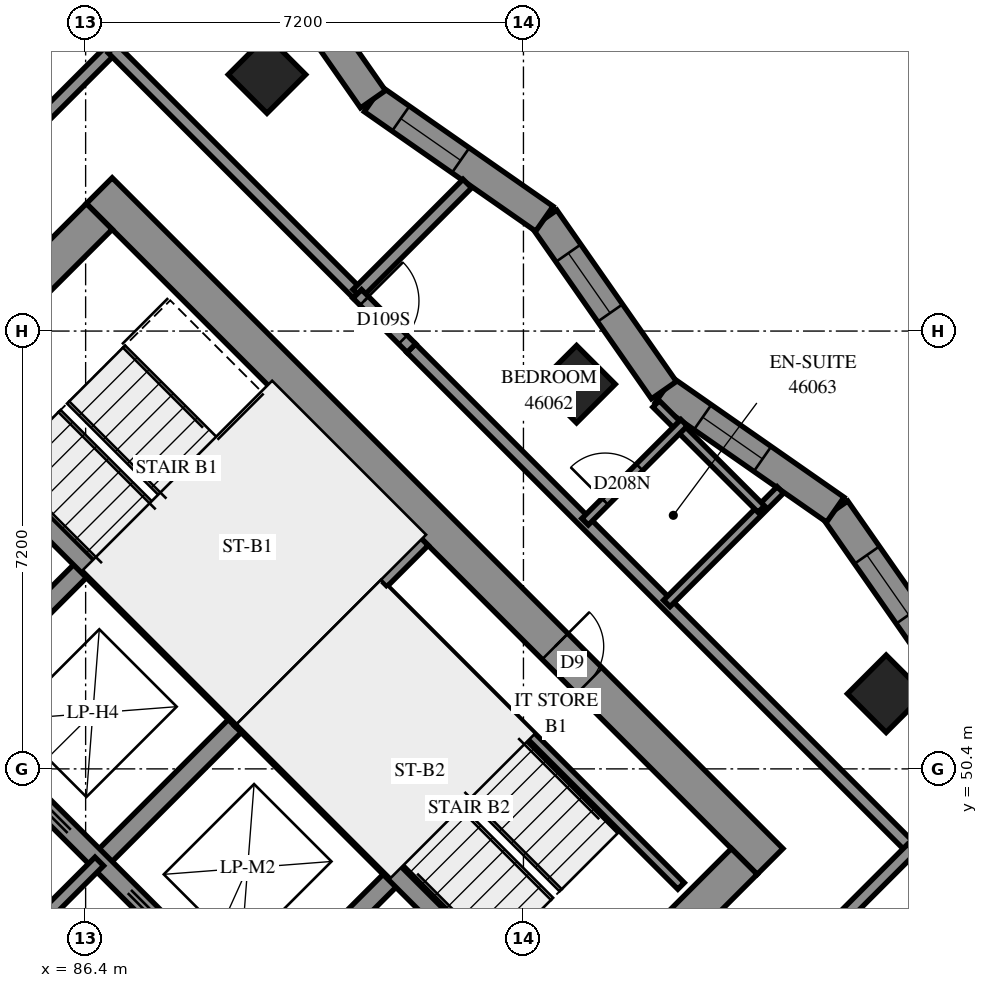
"""IFC4 building model, lengths in metres.
Left out: names, types, materials, properties, quantities, classifications, styles, units other than length and angle.
Written with IfcOpenShell. Run it as: python <this file> out.ifc"""

import sys

from ifc_helpers import new_model, si_unit, direction, frame, frame_2d, origin, origin_2d, place, context, subcontext, project, spatial, polyline, rectangle, outline, extrude, element, fill, save


model = new_model("IFC4")
c1 = context("Model", 3, precision=1e-05, world=origin(), true_north=direction((0.0, 1.0)))
c2 = subcontext(c1, "Body", "Model", "MODEL_VIEW")
j1 = project(units=[si_unit("LENGTHUNIT", "METRE"), si_unit("PLANEANGLEUNIT", "RADIAN")], contexts=[c1])
p1 = place(None, origin())
s1 = spatial("IfcSite", under=j1, at=p1, CompositionType="ELEMENT")
p2 = place(p1, origin())
s2 = spatial("IfcBuilding", under=s1, at=p2, CompositionType="ELEMENT")
p3 = place(p2, frame((0.0, 0.0, 169.4)))
s3 = spatial("IfcBuildingStorey", under=s2, at=p3, CompositionType="ELEMENT", Elevation=169.4)
for number, where, z_axis, x_axis in (
    (1, (89.382, 61.818, 0.0), (0.0, 0.0, 1.0), (0.707, -0.707, 0.0)),
    (2, (94.474, 56.727, 0.0), (0.0, 0.0, 1.0), (0.707, -0.707, 0.0)),
    (3, (99.565, 51.635, 0.0), (0.0, 0.0, 1.0), (0.707, -0.707, 0.0)),
):
    element("IfcColumn", number, at=place(p3, frame(where, z_axis=z_axis, x_axis=x_axis)), inside=s3, PredefinedType="COLUMN", context=c2, shape_type="SweptSolid", body=[
        extrude(rectangle(XDim=0.9, YDim=0.9, at=origin_2d()), origin(), (0.0, 0.0, 1.0), 3.1),
    ])
p4 = place(p3, frame((76.018, 49.302, -0.3), z_axis=(0.0, 0.0, 1.0), x_axis=(0.7071067812, -0.7071067812, 0.0)))
e4 = element("IfcWall", 4, at=p4, inside=s3, PredefinedType="SHEAR", context=c2, shape_type="SweptSolid", body=[
    extrude(rectangle(XDim=15.6, YDim=0.6, at=frame_2d((7.8, 0.0))), origin(), (0.0, 0.0, 1.0), 2.7),
])
p5 = place(p3, frame((86.625, 59.908, -0.3), z_axis=(0.0, 0.0, 1.0), x_axis=(0.7071067812, -0.7071067812, 0.0)))
e5 = element("IfcWall", 5, at=p5, inside=s3, PredefinedType="SHEAR", context=c2, shape_type="SweptSolid", body=[
    extrude(rectangle(XDim=15.6, YDim=0.6, at=frame_2d((7.8, 0.0))), origin(), (0.0, 0.0, 1.0), 2.7),
])
p6 = place(p5, frame((10.6, 0.0, 0.3)))
e6 = element("IfcOpeningElement", 6, at=p6, cuts=e5, PredefinedType="OPENING", context=c2, shape_type="SweptSolid", body=[
    extrude(rectangle(XDim=0.8, YDim=2.1, at=frame_2d((0.4, 1.05))), frame((0.0, 0.31, 0.0), z_axis=(0.0, -1.0, 0.0), x_axis=(1.0, 0.0, 0.0)), (0.0, 0.0, 1.0), 0.62),
])
p7 = place(p3, frame((76.442, 49.302, -0.3), z_axis=(0.0, 0.0, 1.0), x_axis=(0.7071067812, 0.7071067812, 0.0)))
e7 = element("IfcWall", 7, at=p7, inside=s3, PredefinedType="SHEAR", context=c2, shape_type="SweptSolid", body=[
    extrude(rectangle(XDim=14.4, YDim=0.6, at=frame_2d((7.2, 0.0))), origin(), (0.0, 0.0, 1.0), 2.7),
])
p8 = place(p7, frame((4.55, 0.0, 0.3)))
e8 = element("IfcOpeningElement", 8, at=p8, cuts=e7, PredefinedType="OPENING", context=c2, shape_type="SweptSolid", body=[
    extrude(rectangle(XDim=1.1, YDim=2.1, at=frame_2d((0.55, 1.05))), frame((0.0, 0.31, 0.0), z_axis=(0.0, -1.0, 0.0), x_axis=(1.0, 0.0, 0.0)), (0.0, 0.0, 1.0), 0.62),
])
p9 = place(p7, frame((11.35, 0.0, 0.3)))
e9 = element("IfcOpeningElement", 9, at=p9, cuts=e7, PredefinedType="OPENING", context=c2, shape_type="SweptSolid", body=[
    extrude(rectangle(XDim=1.1, YDim=2.1, at=frame_2d((0.55, 1.05))), frame((0.0, 0.31, 0.0), z_axis=(0.0, -1.0, 0.0), x_axis=(1.0, 0.0, 0.0)), (0.0, 0.0, 1.0), 0.62),
])
p10 = place(p3, frame((87.049, 38.695, -0.3), z_axis=(0.0, 0.0, 1.0), x_axis=(0.7071067812, 0.7071067812, 0.0)))
e10 = element("IfcWall", 10, at=p10, inside=s3, PredefinedType="SHEAR", context=c2, shape_type="SweptSolid", body=[
    extrude(rectangle(XDim=14.4, YDim=0.6, at=frame_2d((7.2, 0.0))), origin(), (0.0, 0.0, 1.0), 2.7),
])
p11 = place(p10, frame((4.55, 0.0, 0.3)))
e11 = element("IfcOpeningElement", 11, at=p11, cuts=e10, PredefinedType="OPENING", context=c2, shape_type="SweptSolid", body=[
    extrude(rectangle(XDim=1.1, YDim=2.1, at=frame_2d((0.55, 1.05))), frame((0.0, 0.31, 0.0), z_axis=(0.0, -1.0, 0.0), x_axis=(1.0, 0.0, 0.0)), (0.0, 0.0, 1.0), 0.62),
])
p12 = place(p10, frame((11.35, 0.0, 0.3)))
e12 = element("IfcOpeningElement", 12, at=p12, cuts=e10, PredefinedType="OPENING", context=c2, shape_type="SweptSolid", body=[
    extrude(rectangle(XDim=1.1, YDim=2.1, at=frame_2d((0.55, 1.05))), frame((0.0, 0.31, 0.0), z_axis=(0.0, -1.0, 0.0), x_axis=(1.0, 0.0, 0.0)), (0.0, 0.0, 1.0), 0.62),
])
p13 = place(p3, frame((84.079, 51.423, 0.0), z_axis=(0.0, 0.0, 1.0), x_axis=(0.7071219326, 0.7070916295, 0.0)))
e13 = element("IfcWall", 13, at=p13, inside=s3, PredefinedType="SOLIDWALL", context=c2, shape_type="SweptSolid", body=[
    extrude(rectangle(XDim=3.3, YDim=0.3, at=frame_2d((1.65, 0.0))), origin(), (0.0, 0.0, 1.0), 3.1),
])
for number, where, z_axis, x_axis in (
    (14, (86.625, 48.878, 0.0), (0.0, 0.0, 1.0), (0.707, 0.707, 0.0)),
    (15, (89.17, 46.332, 0.0), (0.0, 0.0, 1.0), (0.707, 0.707, 0.0)),
):
    element("IfcWall", number, at=place(p3, frame(where, z_axis=z_axis, x_axis=x_axis)), inside=s3, PredefinedType="SOLIDWALL", context=c2, shape_type="SweptSolid", body=[
        extrude(rectangle(XDim=3.3, YDim=0.3, at=frame_2d((1.65, 0.0))), origin(), (0.0, 0.0, 1.0), 3.1),
    ])
p14 = place(p3, frame((78.988, 51.423, 0.0), z_axis=(0.0, 0.0, 1.0), x_axis=(0.7071067812, -0.7071067812, 0.0)))
e16 = element("IfcWall", 16, at=p14, inside=s3, PredefinedType="SOLIDWALL", context=c2, shape_type="SweptSolid", body=[
    extrude(rectangle(XDim=14.4, YDim=0.3, at=frame_2d((7.2, 0.0))), origin(), (0.0, 0.0, 1.0), 3.1),
])
p15 = place(p14, frame((1.35, 0.0, 0.0)))
e17 = element("IfcOpeningElement", 17, at=p15, cuts=e16, PredefinedType="OPENING", context=c2, shape_type="SweptSolid", body=[
    extrude(rectangle(XDim=0.9, YDim=2.1, at=frame_2d((0.45, 1.05))), frame((0.0, 0.16, 0.0), z_axis=(0.0, -1.0, 0.0), x_axis=(1.0, 0.0, 0.0)), (0.0, 0.0, 1.0), 0.32),
])
p16 = place(p14, frame((4.95, 0.0, 0.0)))
e18 = element("IfcOpeningElement", 18, at=p16, cuts=e16, PredefinedType="OPENING", context=c2, shape_type="SweptSolid", body=[
    extrude(rectangle(XDim=0.9, YDim=2.1, at=frame_2d((0.45, 1.05))), frame((0.0, 0.16, 0.0), z_axis=(0.0, -1.0, 0.0), x_axis=(1.0, 0.0, 0.0)), (0.0, 0.0, 1.0), 0.32),
])
p17 = place(p14, frame((8.55, 0.0, 0.0)))
e19 = element("IfcOpeningElement", 19, at=p17, cuts=e16, PredefinedType="OPENING", context=c2, shape_type="SweptSolid", body=[
    extrude(rectangle(XDim=0.9, YDim=2.1, at=frame_2d((0.45, 1.05))), frame((0.0, 0.16, 0.0), z_axis=(0.0, -1.0, 0.0), x_axis=(1.0, 0.0, 0.0)), (0.0, 0.0, 1.0), 0.32),
])
p18 = place(p14, frame((12.05, 0.0, 0.0)))
e20 = element("IfcOpeningElement", 20, at=p18, cuts=e16, PredefinedType="OPENING", context=c2, shape_type="SweptSolid", body=[
    extrude(rectangle(XDim=1.1, YDim=2.1, at=frame_2d((0.55, 1.05))), frame((0.0, 0.16, 0.0), z_axis=(0.0, -1.0, 0.0), x_axis=(1.0, 0.0, 0.0)), (0.0, 0.0, 1.0), 0.32),
])
p19 = place(p3, frame((81.534, 53.969, 0.0), z_axis=(0.0, 0.0, 1.0), x_axis=(0.707103309, -0.7071102534, 0.0)))
e21 = element("IfcWall", 21, at=p19, inside=s3, PredefinedType="SOLIDWALL", context=c2, shape_type="SweptSolid", body=[
    extrude(rectangle(XDim=14.4, YDim=0.3, at=frame_2d((7.2, 0.0))), origin(), (0.0, 0.0, 1.0), 3.1),
])
p20 = place(p19, frame((1.25, 0.0, 0.0)))
e22 = element("IfcOpeningElement", 22, at=p20, cuts=e21, PredefinedType="OPENING", context=c2, shape_type="SweptSolid", body=[
    extrude(rectangle(XDim=1.1, YDim=2.1, at=frame_2d((0.55, 1.05))), frame((0.0, 0.16, 0.0), z_axis=(0.0, -1.0, 0.0), x_axis=(1.0, 0.0, 0.0)), (0.0, 0.0, 1.0), 0.32),
])
p21 = place(p19, frame((4.85, 0.0, 0.0)))
e23 = element("IfcOpeningElement", 23, at=p21, cuts=e21, PredefinedType="OPENING", context=c2, shape_type="SweptSolid", body=[
    extrude(rectangle(XDim=1.1, YDim=2.1, at=frame_2d((0.55, 1.05))), frame((0.0, 0.16, 0.0), z_axis=(0.0, -1.0, 0.0), x_axis=(1.0, 0.0, 0.0)), (0.0, 0.0, 1.0), 0.32),
])
p22 = place(p19, frame((8.45, 0.0, 0.0)))
e24 = element("IfcOpeningElement", 24, at=p22, cuts=e21, PredefinedType="OPENING", context=c2, shape_type="SweptSolid", body=[
    extrude(rectangle(XDim=1.1, YDim=2.1, at=frame_2d((0.55, 1.05))), frame((0.0, 0.16, 0.0), z_axis=(0.0, -1.0, 0.0), x_axis=(1.0, 0.0, 0.0)), (0.0, 0.0, 1.0), 0.32),
])
p23 = place(p19, frame((12.05, 0.0, 0.0)))
e25 = element("IfcOpeningElement", 25, at=p23, cuts=e21, PredefinedType="OPENING", context=c2, shape_type="SweptSolid", body=[
    extrude(rectangle(XDim=1.1, YDim=2.1, at=frame_2d((0.55, 1.05))), frame((0.0, 0.16, 0.0), z_axis=(0.0, -1.0, 0.0), x_axis=(1.0, 0.0, 0.0)), (0.0, 0.0, 1.0), 0.32),
])
for number, where, z_axis, x_axis in (
    (26, (83.867, 56.302, 0.0), (0.0, 0.0, 1.0), (0.707, -0.707, 0.0)),
    (27, (88.958, 51.211, 0.0), (0.0, 0.0, 1.0), (0.707, -0.707, 0.0)),
):
    element("IfcWall", number, at=place(p3, frame(where, z_axis=z_axis, x_axis=x_axis)), inside=s3, PredefinedType="SOLIDWALL", context=c2, shape_type="SweptSolid", body=[
        extrude(rectangle(XDim=7.2, YDim=0.3, at=frame_2d((3.6, 0.0))), origin(), (0.0, 0.0, 1.0), 3.1),
    ])
p24 = place(p3, frame((88.958, 51.211, 0.0), z_axis=(0.0, 0.0, 1.0), x_axis=(0.7071067812, 0.7071067812, 0.0)))
e28 = element("IfcWall", 28, at=p24, inside=s3, PredefinedType="SOLIDWALL", context=c2, shape_type="SweptSolid", body=[
    extrude(rectangle(XDim=4.2, YDim=0.3, at=frame_2d((2.1, 0.0))), origin(), (0.0, 0.0, 1.0), 3.1),
])
p25 = place(p3, frame((100.694, 51.844, 0.0), z_axis=(0.0, 0.0, 1.0), x_axis=(-0.5720454818, 0.8202219009, 0.0)))
e29 = element("IfcWall", 29, at=p25, inside=s3, PredefinedType="SOLIDWALL", context=c2, shape_type="SweptSolid", body=[
    extrude(outline(polyline([(0.045, -0.25), (3.481, -0.25), (3.392, 0.25), (-0.045, 0.25), (0.045, -0.25)])), origin(), (0.0, 0.0, 1.0), 3.1),
])
p26 = place(p25, frame((1.327, 0.0, 0.45)))
e30 = element("IfcOpeningElement", 30, at=p26, cuts=e29, PredefinedType="OPENING", context=c2, shape_type="SweptSolid", body=[
    extrude(rectangle(XDim=1.2, YDim=2.5, at=frame_2d((0.6, 1.25))), frame((0.0, 0.26, 0.0), z_axis=(0.0, -1.0, 0.0), x_axis=(1.0, 0.0, 0.0)), (0.0, 0.0, 1.0), 0.52),
])
p27 = place(p3, frame((98.728, 54.662, 0.0), z_axis=(0.0, 0.0, 1.0), x_axis=(-0.8202082464, 0.5720650597, 0.0)))
e31 = element("IfcWall", 31, at=p27, inside=s3, PredefinedType="SOLIDWALL", context=c2, shape_type="SweptSolid", body=[
    extrude(outline(polyline([(-0.045, -0.25), (3.392, -0.25), (3.481, 0.25), (0.045, 0.25), (-0.045, -0.25)])), origin(), (0.0, 0.0, 1.0), 3.1),
])
p28 = place(p27, frame((1.459, 0.0, 0.45)))
e32 = element("IfcOpeningElement", 32, at=p28, cuts=e31, PredefinedType="OPENING", context=c2, shape_type="SweptSolid", body=[
    extrude(rectangle(XDim=1.2, YDim=2.5, at=frame_2d((0.6, 1.25))), frame((0.0, 0.26, 0.0), z_axis=(0.0, -1.0, 0.0), x_axis=(1.0, 0.0, 0.0)), (0.0, 0.0, 1.0), 0.52),
])
p29 = place(p3, frame((95.91, 56.628, 0.0), z_axis=(0.0, 0.0, 1.0), x_axis=(-0.5720591366, 0.8202123775, 0.0)))
e33 = element("IfcWall", 33, at=p29, inside=s3, PredefinedType="SOLIDWALL", context=c2, shape_type="SweptSolid", body=[
    extrude(outline(polyline([(0.045, -0.25), (3.481, -0.25), (3.392, 0.25), (-0.045, 0.25), (0.045, -0.25)])), origin(), (0.0, 0.0, 1.0), 3.1),
])
p30 = place(p29, frame((1.547, 0.0, 0.45)))
e34 = element("IfcOpeningElement", 34, at=p30, cuts=e33, PredefinedType="OPENING", context=c2, shape_type="SweptSolid", body=[
    extrude(rectangle(XDim=1.2, YDim=2.5, at=frame_2d((0.6, 1.25))), frame((0.0, 0.26, 0.0), z_axis=(0.0, -1.0, 0.0), x_axis=(1.0, 0.0, 0.0)), (0.0, 0.0, 1.0), 0.52),
])
p31 = place(p3, frame((93.944, 59.447, 0.0), z_axis=(0.0, 0.0, 1.0), x_axis=(-0.8202082464, 0.5720650597, 0.0)))
e35 = element("IfcWall", 35, at=p31, inside=s3, PredefinedType="SOLIDWALL", context=c2, shape_type="SweptSolid", body=[
    extrude(outline(polyline([(-0.045, -0.25), (3.392, -0.25), (3.481, 0.25), (0.045, 0.25), (-0.045, -0.25)])), origin(), (0.0, 0.0, 1.0), 3.1),
])
p32 = place(p31, frame((1.68, 0.0, 0.45)))
e36 = element("IfcOpeningElement", 36, at=p32, cuts=e35, PredefinedType="OPENING", context=c2, shape_type="SweptSolid", body=[
    extrude(rectangle(XDim=1.2, YDim=2.5, at=frame_2d((0.6, 1.25))), frame((0.0, 0.26, 0.0), z_axis=(0.0, -1.0, 0.0), x_axis=(1.0, 0.0, 0.0)), (0.0, 0.0, 1.0), 0.52),
])
p33 = place(p3, frame((91.126, 61.412, 0.0), z_axis=(0.0, 0.0, 1.0), x_axis=(-0.5720454818, 0.8202219009, 0.0)))
e37 = element("IfcWall", 37, at=p33, inside=s3, PredefinedType="SOLIDWALL", context=c2, shape_type="SweptSolid", body=[
    extrude(outline(polyline([(0.045, -0.25), (3.481, -0.25), (3.392, 0.25), (-0.045, 0.25), (0.045, -0.25)])), origin(), (0.0, 0.0, 1.0), 3.1),
])
p34 = place(p33, frame((1.768, 0.0, 0.45)))
e38 = element("IfcOpeningElement", 38, at=p34, cuts=e37, PredefinedType="OPENING", context=c2, shape_type="SweptSolid", body=[
    extrude(rectangle(XDim=1.2, YDim=2.5, at=frame_2d((0.6, 1.25))), frame((0.0, 0.26, 0.0), z_axis=(0.0, -1.0, 0.0), x_axis=(1.0, 0.0, 0.0)), (0.0, 0.0, 1.0), 0.52),
])
p35 = place(p3, frame((91.313, 53.354, 0.0), z_axis=(0.0, 0.0, 1.0), x_axis=(0.7071140275, -0.7070995348, 0.0)))
e39 = element("IfcWall", 39, at=p35, inside=s3, PredefinedType="PARTITIONING", context=c2, shape_type="SweptSolid", body=[
    extrude(rectangle(XDim=6.9, YDim=0.15, at=frame_2d((3.45, 0.0))), origin(), (0.0, 0.0, 1.0), 3.1),
])
p36 = place(p3, frame((84.079, 46.332, 0.0), z_axis=(0.0, 0.0, 1.0), x_axis=(0.7071067812, 0.7071067812, 0.0)))
e40 = element("IfcWall", 40, at=p36, inside=s3, PredefinedType="PARTITIONING", context=c2, shape_type="SweptSolid", body=[
    extrude(rectangle(XDim=3.6, YDim=0.2, at=frame_2d((1.8, 0.0))), origin(), (0.0, 0.0, 1.0), 3.1),
])
p37 = place(p3, frame((94.366, 41.348, 0.0), z_axis=(0.0, 0.0, 1.0), x_axis=(0.7071108904, 0.707102672, 0.0)))
e41 = element("IfcWall", 41, at=p37, inside=s3, PredefinedType="PARTITIONING", context=c2, shape_type="SweptSolid", body=[
    extrude(rectangle(XDim=12.168, YDim=0.2, at=frame_2d((6.084, 0.0))), origin(), (0.0, 0.0, 1.0), 3.1),
])
p38 = place(p3, frame((91.755, 57.317, 0.0), z_axis=(0.0, 0.0, 1.0), x_axis=(0.7071067812, -0.7071067812, 0.0)))
e42 = element("IfcWall", 42, at=p38, inside=s3, PredefinedType="PARTITIONING", context=c2, shape_type="SweptSolid", body=[
    extrude(rectangle(XDim=11.639, YDim=0.2, at=frame_2d((5.819, 0.0))), origin(), (0.0, 0.0, 1.0), 3.1),
])
p39 = place(p3, frame((80.154, 55.56, 0.0), z_axis=(0.0, 0.0, 1.0), x_axis=(0.7071067812, 0.7071067812, 0.0)))
e43 = element("IfcWall", 43, at=p39, inside=s3, PredefinedType="PARTITIONING", context=c2, shape_type="SweptSolid", body=[
    extrude(rectangle(XDim=9.45, YDim=0.2, at=frame_2d((4.725, 0.0))), origin(), (0.0, 0.0, 1.0), 3.1),
])
p40 = place(p39, frame((0.292, 0.0, 0.0)))
e44 = element("IfcOpeningElement", 44, at=p40, cuts=e43, PredefinedType="OPENING", context=c2, shape_type="SweptSolid", body=[
    extrude(rectangle(XDim=1.0, YDim=2.1, at=frame_2d((0.5, 1.05))), frame((0.0, 0.11, 0.0), z_axis=(0.0, -1.0, 0.0), x_axis=(1.0, 0.0, 0.0)), (0.0, 0.0, 1.0), 0.22),
])
p41 = place(p3, frame((93.306, 42.408, 0.0), z_axis=(0.0, 0.0, 1.0), x_axis=(0.7071067812, 0.7071067812, 0.0)))
e45 = element("IfcWall", 45, at=p41, inside=s3, PredefinedType="PARTITIONING", context=c2, shape_type="SweptSolid", body=[
    extrude(rectangle(XDim=9.45, YDim=0.2, at=frame_2d((4.725, 0.0))), origin(), (0.0, 0.0, 1.0), 3.1),
])
p42 = place(p41, frame((0.253, 0.0, 0.0)))
e46 = element("IfcOpeningElement", 46, at=p42, cuts=e45, PredefinedType="OPENING", context=c2, shape_type="SweptSolid", body=[
    extrude(rectangle(XDim=1.0, YDim=2.1, at=frame_2d((0.5, 1.05))), frame((0.0, 0.11, 0.0), z_axis=(0.0, -1.0, 0.0), x_axis=(1.0, 0.0, 0.0)), (0.0, 0.0, 1.0), 0.22),
])
p43 = place(p3, frame((86.841, 62.245, 0.0), z_axis=(0.0, 0.0, 1.0), x_axis=(0.7071067812, -0.7071067812, 0.0)))
e47 = element("IfcWall", 47, at=p43, inside=s3, PredefinedType="PARTITIONING", context=c2, shape_type="SweptSolid", body=[
    extrude(rectangle(XDim=5.699, YDim=0.2, at=frame_2d((2.85, 0.0))), origin(), (0.0, 0.0, 1.0), 3.1),
])
p44 = place(p3, frame((95.957, 53.121, 0.0), z_axis=(0.0, 0.0, 1.0), x_axis=(0.7070878465, 0.7071257154, 0.0)))
e48 = element("IfcWall", 48, at=p44, inside=s3, PredefinedType="PARTITIONING", context=c2, shape_type="SweptSolid", body=[
    extrude(rectangle(XDim=2.641, YDim=0.15, at=frame_2d((1.32, 0.0))), origin(), (0.0, 0.0, 1.0), 3.1),
])
p45 = place(p3, frame((90.867, 58.213, 0.0), z_axis=(0.0, 0.0, 1.0), x_axis=(0.7066186165, 0.7075946091, 0.0)))
e49 = element("IfcWall", 49, at=p45, inside=s3, PredefinedType="PARTITIONING", context=c2, shape_type="SweptSolid", body=[
    extrude(rectangle(XDim=2.562, YDim=0.2, at=frame_2d((1.281, 0.0))), origin(), (0.0, 0.0, 1.0), 3.1),
])
p46 = place(p3, frame((95.781, 56.402, 0.0), z_axis=(0.0, 0.0, 1.0), x_axis=(0.7071067812, -0.7071067812, 0.0)))
e50 = element("IfcWall", 50, at=p46, inside=s3, PredefinedType="PARTITIONING", context=c2, shape_type="SweptSolid", body=[
    extrude(rectangle(XDim=2.446, YDim=0.15, at=frame_2d((1.223, 0.0))), origin(), (0.0, 0.0, 1.0), 3.1),
])
p47 = place(p3, frame((94.614, 54.464, 0.0), z_axis=(0.0, 0.0, 1.0), x_axis=(0.7070850605, 0.7071285012, 0.0)))
e51 = element("IfcWall", 51, at=p47, inside=s3, PredefinedType="PARTITIONING", context=c2, shape_type="SweptSolid", body=[
    extrude(rectangle(XDim=2.302, YDim=0.15, at=frame_2d((1.151, 0.0))), origin(), (0.0, 0.0, 1.0), 3.1),
])
p48 = place(p47, frame((0.466, 0.0, 0.0)))
e52 = element("IfcOpeningElement", 52, at=p48, cuts=e51, PredefinedType="OPENING", context=c2, shape_type="SweptSolid", body=[
    extrude(rectangle(XDim=0.8, YDim=2.1, at=frame_2d((0.4, 1.05))), frame((0.0, 0.085, 0.0), z_axis=(0.0, -1.0, 0.0), x_axis=(1.0, 0.0, 0.0)), (0.0, 0.0, 1.0), 0.17),
])
p49 = place(p3, frame((90.867, 58.211, 0.0), z_axis=(0.0, 0.0, 1.0), x_axis=(0.706312726, -0.7078999456, 0.0)))
e53 = element("IfcWall", 53, at=p49, inside=s3, PredefinedType="PARTITIONING", context=c2, shape_type="SweptSolid", body=[
    extrude(rectangle(XDim=1.26, YDim=0.2, at=frame_2d((0.63, 0.0))), origin(), (0.0, 0.0, 1.0), 3.1),
])
p50 = place(p49, frame((0.162, 0.0, 0.0)))
e54 = element("IfcOpeningElement", 54, at=p50, cuts=e53, PredefinedType="OPENING", context=c2, shape_type="SweptSolid", body=[
    extrude(rectangle(XDim=0.9, YDim=2.1, at=frame_2d((0.45, 1.05))), frame((0.0, 0.11, 0.0), z_axis=(0.0, -1.0, 0.0), x_axis=(1.0, 0.0, 0.0)), (0.0, 0.0, 1.0), 0.22),
])
p51 = place(p26, origin())
e55 = element("IfcWindow", 55, at=p51, inside=s3, PartitioningType="SINGLE_PANEL", PredefinedType="WINDOW", context=c2, shape_type="SweptSolid", body=[
    extrude(rectangle(XDim=1.2, YDim=2.5, at=frame_2d((0.6, 1.25))), frame((0.0, 0.18, 0.0), z_axis=(0.0, -1.0, 0.0), x_axis=(1.0, 0.0, 0.0)), (0.0, 0.0, 1.0), 0.06),
])
fill(e30, e55)
p52 = place(p28, origin())
e56 = element("IfcWindow", 56, at=p52, inside=s3, PartitioningType="SINGLE_PANEL", PredefinedType="WINDOW", context=c2, shape_type="SweptSolid", body=[
    extrude(rectangle(XDim=1.2, YDim=2.5, at=frame_2d((0.6, 1.25))), frame((0.0, 0.18, 0.0), z_axis=(0.0, -1.0, 0.0), x_axis=(1.0, 0.0, 0.0)), (0.0, 0.0, 1.0), 0.06),
])
fill(e32, e56)
p53 = place(p30, origin())
e57 = element("IfcWindow", 57, at=p53, inside=s3, PartitioningType="SINGLE_PANEL", PredefinedType="WINDOW", context=c2, shape_type="SweptSolid", body=[
    extrude(rectangle(XDim=1.2, YDim=2.5, at=frame_2d((0.6, 1.25))), frame((0.0, 0.18, 0.0), z_axis=(0.0, -1.0, 0.0), x_axis=(1.0, 0.0, 0.0)), (0.0, 0.0, 1.0), 0.06),
])
fill(e34, e57)
p54 = place(p32, origin())
e58 = element("IfcWindow", 58, at=p54, inside=s3, PartitioningType="SINGLE_PANEL", PredefinedType="WINDOW", context=c2, shape_type="SweptSolid", body=[
    extrude(rectangle(XDim=1.2, YDim=2.5, at=frame_2d((0.6, 1.25))), frame((0.0, 0.18, 0.0), z_axis=(0.0, -1.0, 0.0), x_axis=(1.0, 0.0, 0.0)), (0.0, 0.0, 1.0), 0.06),
])
fill(e36, e58)
p55 = place(p6, origin())
e59 = element("IfcDoor", 59, at=p55, inside=s3, OperationType="SINGLE_SWING_RIGHT", PredefinedType="DOOR", context=c2, shape_type="SweptSolid", body=[
    extrude(rectangle(XDim=0.8, YDim=2.1, at=frame_2d((0.4, 1.05))), frame((0.0, 0.025, 0.0), z_axis=(0.0, -1.0, 0.0), x_axis=(1.0, 0.0, 0.0)), (0.0, 0.0, 1.0), 0.05),
])
fill(e6, e59)
p56 = place(p50, origin())
e60 = element("IfcDoor", 60, at=p56, inside=s3, OperationType="SINGLE_SWING_RIGHT", PredefinedType="DOOR", context=c2, shape_type="SweptSolid", body=[
    extrude(rectangle(XDim=0.9, YDim=2.1, at=frame_2d((0.45, 1.05))), frame((0.0, 0.025, 0.0), z_axis=(0.0, -1.0, 0.0), x_axis=(1.0, 0.0, 0.0)), (0.0, 0.0, 1.0), 0.05),
])
fill(e54, e60)
p57 = place(p48, origin())
e61 = element("IfcDoor", 61, at=p57, inside=s3, OperationType="SINGLE_SWING_RIGHT", PredefinedType="DOOR", context=c2, shape_type="SweptSolid", body=[
    extrude(rectangle(XDim=0.8, YDim=2.1, at=frame_2d((0.4, 1.05))), frame((0.0, 0.025, 0.0), z_axis=(0.0, -1.0, 0.0), x_axis=(1.0, 0.0, 0.0)), (0.0, 0.0, 1.0), 0.05),
])
fill(e52, e61)
save(model, sys.argv[1])
